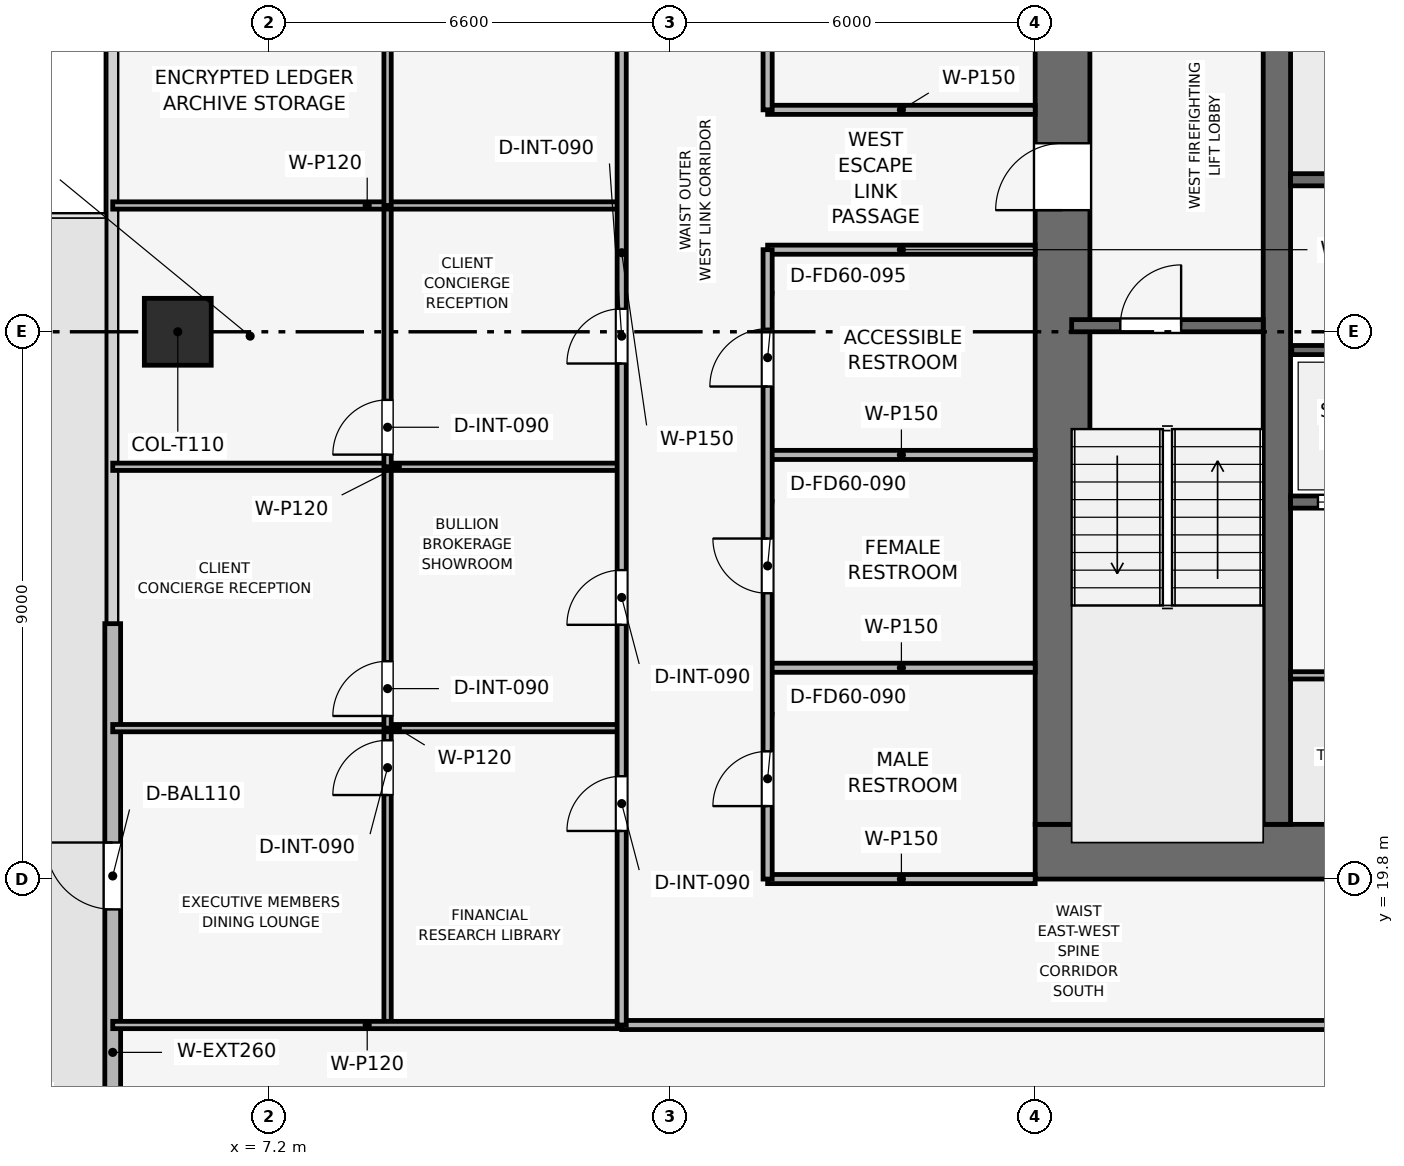
"""IFC4 building model, lengths in metres.
Left out: names, types, materials, properties, quantities, classifications, styles, units other than length and angle.
Written with IfcOpenShell. Run it as: python <this file> out.ifc"""

import sys

from ifc_helpers import new_model, si_unit, direction, frame, frame_2d, origin, origin_2d, place, context, subcontext, project, spatial, rectangle, extrude, element, fill, save


model = new_model("IFC4")
c1 = context("Model", 3, precision=1e-05, world=origin(), true_north=direction((0.0, 1.0)))
c2 = subcontext(c1, "Body", "Model", "MODEL_VIEW")
j1 = project(units=[si_unit("LENGTHUNIT", "METRE"), si_unit("PLANEANGLEUNIT", "RADIAN")], contexts=[c1])
p1 = place(None, origin())
s1 = spatial("IfcSite", under=j1, at=p1, CompositionType="ELEMENT")
p2 = place(p1, origin())
s2 = spatial("IfcBuilding", under=s1, at=p2, CompositionType="ELEMENT")
p3 = place(p2, frame((0.0, 0.0, 153.3)))
s3 = spatial("IfcBuildingStorey", under=s2, at=p3, CompositionType="ELEMENT", Elevation=153.3)
p4 = place(p3, frame((19.8, 20.25, 0.0), z_axis=(0.0, 0.0, 1.0), x_axis=(1.0, 0.0, 0.0)))
e1 = element("IfcWall", 1, at=p4, inside=s3, PredefinedType="SHEAR", context=c2, shape_type="SweptSolid", body=[
    extrude(rectangle(XDim=18.0, YDim=0.9, at=frame_2d((9.0, 0.0))), origin(), (0.0, 0.0, 1.0), 3.75),
])
p5 = place(p4, frame((8.4, 0.0, 0.0)))
e2 = element("IfcOpeningElement", 2, at=p5, cuts=e1, PredefinedType="OPENING", context=c2, shape_type="SweptSolid", body=[
    extrude(rectangle(XDim=1.2, YDim=2.2, at=frame_2d((0.6, 1.1))), frame((0.0, 0.46, 0.0), z_axis=(0.0, -1.0, 0.0), x_axis=(1.0, 0.0, 0.0)), (0.0, 0.0, 1.0), 0.92),
])
p6 = place(p3, frame((20.25, 20.7, 0.0), z_axis=(0.0, 0.0, 1.0), x_axis=(0.0, 1.0, 0.0)))
e3 = element("IfcWall", 3, at=p6, inside=s3, PredefinedType="SHEAR", context=c2, shape_type="SweptSolid", body=[
    extrude(rectangle(XDim=16.2, YDim=0.9, at=frame_2d((8.1, 0.0))), origin(), (0.0, 0.0, 1.0), 3.75),
])
p7 = place(p6, frame((10.1, 0.0, 0.0)))
e4 = element("IfcOpeningElement", 4, at=p7, cuts=e3, PredefinedType="OPENING", context=c2, shape_type="SweptSolid", body=[
    extrude(rectangle(XDim=1.1, YDim=2.15, at=frame_2d((0.55, 1.075))), frame((0.0, 0.46, 0.0), z_axis=(0.0, -1.0, 0.0), x_axis=(1.0, 0.0, 0.0)), (0.0, 0.0, 1.0), 0.92),
])
p8 = place(p3, frame((23.775, 20.7, 0.0), z_axis=(0.0, 0.0, 1.0), x_axis=(0.0, 1.0, 0.0)))
e5 = element("IfcWall", 5, at=p8, inside=s3, PredefinedType="SHEAR", context=c2, shape_type="SweptSolid", body=[
    extrude(rectangle(XDim=16.2, YDim=0.45, at=frame_2d((8.1, 0.0))), origin(), (0.0, 0.0, 1.0), 3.75),
])
p9 = place(p3, frame((5.7, 28.8, 0.003), z_axis=(0.0, 0.0, 1.0), x_axis=(1.0, 0.0, 0.0)))
e6 = element("IfcColumn", 6, at=p9, inside=s3, PredefinedType="COLUMN", context=c2, shape_type="SweptSolid", body=[
    extrude(rectangle(XDim=1.1, YDim=1.1, at=origin_2d()), origin(), (0.0, 0.0, 1.0), 3.489),
])
p10 = place(p3, frame((4.63, 11.4, 0.0), z_axis=(0.0, 0.0, 1.0), x_axis=(0.0, 1.0, 0.0)))
e7 = element("IfcWall", 7, at=p10, inside=s3, PredefinedType="SOLIDWALL", context=c2, shape_type="SweptSolid", body=[
    extrude(rectangle(XDim=12.6, YDim=0.26, at=frame_2d((6.3, 0.0))), origin(), (0.0, 0.0, 1.0), 3.495),
])
p11 = place(p10, frame((7.901, 0.0, 0.0)))
e8 = element("IfcOpeningElement", 8, at=p11, cuts=e7, PredefinedType="OPENING", context=c2, shape_type="SweptSolid", body=[
    extrude(rectangle(XDim=1.1, YDim=2.2, at=frame_2d((0.55, 1.1))), frame((0.0, 0.14, 0.0), z_axis=(0.0, -1.0, 0.0), x_axis=(1.0, 0.0, 0.0)), (0.0, 0.0, 1.0), 0.28),
])
p12 = place(p3, frame((20.4, 28.9, 0.0), z_axis=(0.0, 0.0, 1.0), x_axis=(1.0, 0.0, 0.0)))
e9 = element("IfcWall", 9, at=p12, inside=s3, PredefinedType="SHEAR", context=c2, shape_type="SweptSolid", body=[
    extrude(rectangle(XDim=3.15, YDim=0.2, at=frame_2d((1.575, 0.0))), origin(), (0.0, 0.0, 1.0), 3.495),
])
p13 = place(p12, frame((0.8, 0.0, 0.0)))
e10 = element("IfcOpeningElement", 10, at=p13, cuts=e9, PredefinedType="OPENING", context=c2, shape_type="SweptSolid", body=[
    extrude(rectangle(XDim=1.0, YDim=2.1, at=frame_2d((0.5, 1.05))), frame((0.0, 0.11, 0.0), z_axis=(0.0, -1.0, 0.0), x_axis=(1.0, 0.0, 0.0)), (0.0, 0.0, 1.0), 0.22),
])
p14 = place(p3, frame((24.0, 26.0, 0.0), z_axis=(0.0, 0.0, 1.0), x_axis=(1.0, 0.0, 0.0)))
e11 = element("IfcWall", 11, at=p14, inside=s3, PredefinedType="SHEAR", context=c2, shape_type="SweptSolid", body=[
    extrude(rectangle(XDim=2.0, YDim=0.2, at=frame_2d((1.0, 0.0))), origin(), (0.0, 0.0, 1.0), 3.495),
])
p15 = place(p14, frame((0.45, 0.0, 0.0)))
e12 = element("IfcOpeningElement", 12, at=p15, cuts=e11, PredefinedType="OPENING", context=c2, shape_type="SweptSolid", body=[
    extrude(rectangle(XDim=1.1, YDim=2.15, at=frame_2d((0.55, 1.075))), frame((0.0, 0.11, 0.0), z_axis=(0.0, -1.0, 0.0), x_axis=(1.0, 0.0, 0.0)), (0.0, 0.0, 1.0), 0.22),
])
p16 = place(p3, frame((24.0, 31.3, 0.0), z_axis=(0.0, 0.0, 1.0), x_axis=(1.0, 0.0, 0.0)))
e13 = element("IfcWall", 13, at=p16, inside=s3, PredefinedType="SHEAR", context=c2, shape_type="SweptSolid", body=[
    extrude(rectangle(XDim=2.0, YDim=0.2, at=frame_2d((1.0, 0.0))), origin(), (0.0, 0.0, 1.0), 3.495),
])
p17 = place(p3, frame((24.02, 28.5, 0.0), z_axis=(0.0, 0.0, 1.0), x_axis=(1.0, 0.0, 0.0)))
e14 = element("IfcWall", 14, at=p17, inside=s3, PredefinedType="SHEAR", context=c2, shape_type="SweptSolid", body=[
    extrude(rectangle(XDim=4.08, YDim=0.15, at=frame_2d((2.04, 0.0))), origin(), (0.0, 0.0, 1.0), 3.495),
])
p18 = place(p3, frame((24.0, 23.15, 0.0), z_axis=(0.0, 0.0, 1.0), x_axis=(1.0, 0.0, 0.0)))
e15 = element("IfcWall", 15, at=p18, inside=s3, PredefinedType="PARTITIONING", context=c2, shape_type="SweptSolid", body=[
    extrude(rectangle(XDim=4.05, YDim=0.12, at=frame_2d((2.025, 0.0))), origin(), (0.0, 0.0, 1.0), 3.495),
])
p19 = place(p18, frame((1.575, 0.0, 0.0)))
e16 = element("IfcOpeningElement", 16, at=p19, cuts=e15, PredefinedType="OPENING", context=c2, shape_type="SweptSolid", body=[
    extrude(rectangle(XDim=0.9, YDim=2.1, at=frame_2d((0.45, 1.05))), frame((0.0, 0.07, 0.0), z_axis=(0.0, -1.0, 0.0), x_axis=(1.0, 0.0, 0.0)), (0.0, 0.0, 1.0), 0.14),
])
p20 = place(p3, frame((15.4, 19.8, 0.0), z_axis=(0.0, 0.0, 1.0), x_axis=(1.0, 0.0, 0.0)))
e17 = element("IfcWall", 17, at=p20, inside=s3, PredefinedType="PARTITIONING", context=c2, shape_type="SweptSolid", body=[
    extrude(rectangle(XDim=4.4, YDim=0.15, at=frame_2d((2.2, 0.0))), origin(), (0.0, 0.0, 1.0), 3.03),
])
for number, where, z_axis, x_axis in (
    (18, (15.4, 23.275, 0.0), (0.0, 0.0, 1.0), (1.0, 0.0, 0.0)),
    (19, (15.4, 26.775, 0.0), (0.0, 0.0, 1.0), (1.0, 0.0, 0.0)),
    (20, (15.4, 30.15, 0.0), (0.0, 0.0, 1.0), (1.0, 0.0, 0.0)),
    (21, (15.4, 32.45, 0.0), (0.0, 0.0, 1.0), (1.0, 0.0, 0.0)),
):
    element("IfcWall", number, at=place(p3, frame(where, z_axis=z_axis, x_axis=x_axis)), inside=s3, PredefinedType="PARTITIONING", context=c2, shape_type="SweptSolid", body=[
        extrude(rectangle(XDim=4.4, YDim=0.15, at=frame_2d((2.2, 0.0))), origin(), (0.0, 0.0, 1.0), 3.495),
    ])
p21 = place(p3, frame((15.4, 19.8, 0.0), z_axis=(0.0, 0.0, 1.0), x_axis=(0.0, 1.0, 0.0)))
e22 = element("IfcWall", 22, at=p21, inside=s3, PredefinedType="PARTITIONING", context=c2, shape_type="SweptSolid", body=[
    extrude(rectangle(XDim=10.35, YDim=0.15, at=frame_2d((5.175, 0.0))), origin(), (0.0, 0.0, 1.0), 3.03),
])
p22 = place(p21, frame((1.2, 0.0, 0.0)))
e23 = element("IfcOpeningElement", 23, at=p22, cuts=e22, PredefinedType="OPENING", context=c2, shape_type="SweptSolid", body=[
    extrude(rectangle(XDim=0.9, YDim=2.1, at=frame_2d((0.45, 1.05))), frame((0.0, 0.085, 0.0), z_axis=(0.0, -1.0, 0.0), x_axis=(1.0, 0.0, 0.0)), (0.0, 0.0, 1.0), 0.17),
])
p23 = place(p21, frame((4.7, 0.0, 0.0)))
e24 = element("IfcOpeningElement", 24, at=p23, cuts=e22, PredefinedType="OPENING", context=c2, shape_type="SweptSolid", body=[
    extrude(rectangle(XDim=0.9, YDim=2.1, at=frame_2d((0.45, 1.05))), frame((0.0, 0.085, 0.0), z_axis=(0.0, -1.0, 0.0), x_axis=(1.0, 0.0, 0.0)), (0.0, 0.0, 1.0), 0.17),
])
p24 = place(p21, frame((8.1, 0.0, 0.0)))
e25 = element("IfcOpeningElement", 25, at=p24, cuts=e22, PredefinedType="OPENING", context=c2, shape_type="SweptSolid", body=[
    extrude(rectangle(XDim=0.95, YDim=2.1, at=frame_2d((0.475, 1.05))), frame((0.0, 0.085, 0.0), z_axis=(0.0, -1.0, 0.0), x_axis=(1.0, 0.0, 0.0)), (0.0, 0.0, 1.0), 0.17),
])
p25 = place(p3, frame((15.4, 32.45, 0.0), z_axis=(0.0, 0.0, 1.0), x_axis=(0.0, 1.0, 0.0)))
e26 = element("IfcWall", 26, at=p25, inside=s3, PredefinedType="PARTITIONING", context=c2, shape_type="SweptSolid", body=[
    extrude(rectangle(XDim=5.35, YDim=0.15, at=frame_2d((2.675, 0.0))), origin(), (0.0, 0.0, 1.0), 3.03),
])
p26 = place(p25, frame((2.1, 0.0, 0.0)))
e27 = element("IfcOpeningElement", 27, at=p26, cuts=e26, PredefinedType="OPENING", context=c2, shape_type="SweptSolid", body=[
    extrude(rectangle(XDim=0.9, YDim=2.1, at=frame_2d((0.45, 1.05))), frame((0.0, 0.085, 0.0), z_axis=(0.0, -1.0, 0.0), x_axis=(1.0, 0.0, 0.0)), (0.0, 0.0, 1.0), 0.17),
])
p27 = place(p3, frame((9.15, 17.4, 0.0), z_axis=(0.0, 0.0, 1.0), x_axis=(0.0, 1.0, 0.0)))
e28 = element("IfcWall", 28, at=p27, inside=s3, PredefinedType="PARTITIONING", context=c2, shape_type="SweptSolid", body=[
    extrude(rectangle(XDim=4.882, YDim=0.12, at=frame_2d((2.441, 0.0))), origin(), (0.0, 0.0, 1.0), 3.03),
])
p28 = place(p27, frame((3.782, 0.0, 0.0)))
e29 = element("IfcOpeningElement", 29, at=p28, cuts=e28, PredefinedType="OPENING", context=c2, shape_type="SweptSolid", body=[
    extrude(rectangle(XDim=0.9, YDim=2.1, at=frame_2d((0.45, 1.05))), frame((0.0, 0.07, 0.0), z_axis=(0.0, -1.0, 0.0), x_axis=(1.0, 0.0, 0.0)), (0.0, 0.0, 1.0), 0.14),
])
p29 = place(p3, frame((4.63, 22.282, 0.0), z_axis=(0.0, 0.0, 1.0), x_axis=(1.0, 0.0, 0.0)))
e30 = element("IfcWall", 30, at=p29, inside=s3, PredefinedType="PARTITIONING", context=c2, shape_type="SweptSolid", body=[
    extrude(rectangle(XDim=8.37, YDim=0.12, at=frame_2d((4.185, 0.0))), origin(), (0.0, 0.0, 1.0), 2.98),
])
p30 = place(p3, frame((9.15, 22.282, 0.0), z_axis=(0.0, 0.0, 1.0), x_axis=(0.0, 1.0, 0.0)))
e31 = element("IfcWall", 31, at=p30, inside=s3, PredefinedType="PARTITIONING", context=c2, shape_type="SweptSolid", body=[
    extrude(rectangle(XDim=4.298, YDim=0.12, at=frame_2d((2.149, 0.0))), origin(), (0.0, 0.0, 1.0), 3.495),
])
p31 = place(p30, frame((0.2, 0.0, 0.0)))
e32 = element("IfcOpeningElement", 32, at=p31, cuts=e31, PredefinedType="OPENING", context=c2, shape_type="SweptSolid", body=[
    extrude(rectangle(XDim=0.9, YDim=2.1, at=frame_2d((0.45, 1.05))), frame((0.0, 0.07, 0.0), z_axis=(0.0, -1.0, 0.0), x_axis=(1.0, 0.0, 0.0)), (0.0, 0.0, 1.0), 0.14),
])
p32 = place(p3, frame((4.63, 26.58, 0.0), z_axis=(0.0, 0.0, 1.0), x_axis=(1.0, 0.0, 0.0)))
e33 = element("IfcWall", 33, at=p32, inside=s3, PredefinedType="PARTITIONING", context=c2, shape_type="SweptSolid", body=[
    extrude(rectangle(XDim=8.37, YDim=0.12, at=frame_2d((4.185, 0.0))), origin(), (0.0, 0.0, 1.0), 2.98),
])
p33 = place(p3, frame((9.15, 26.58, 0.0), z_axis=(0.0, 0.0, 1.0), x_axis=(0.0, 1.0, 0.0)))
e34 = element("IfcWall", 34, at=p33, inside=s3, PredefinedType="PARTITIONING", context=c2, shape_type="SweptSolid", body=[
    extrude(rectangle(XDim=4.297, YDim=0.12, at=frame_2d((2.148, 0.0))), origin(), (0.0, 0.0, 1.0), 3.03),
])
p34 = place(p33, frame((0.2, 0.0, 0.0)))
e35 = element("IfcOpeningElement", 35, at=p34, cuts=e34, PredefinedType="OPENING", context=c2, shape_type="SweptSolid", body=[
    extrude(rectangle(XDim=0.9, YDim=2.1, at=frame_2d((0.45, 1.05))), frame((0.0, 0.07, 0.0), z_axis=(0.0, -1.0, 0.0), x_axis=(1.0, 0.0, 0.0)), (0.0, 0.0, 1.0), 0.14),
])
p35 = place(p3, frame((4.63, 30.877, 0.0), z_axis=(0.0, 0.0, 1.0), x_axis=(1.0, 0.0, 0.0)))
e36 = element("IfcWall", 36, at=p35, inside=s3, PredefinedType="PARTITIONING", context=c2, shape_type="SweptSolid", body=[
    extrude(rectangle(XDim=8.37, YDim=0.12, at=frame_2d((4.185, 0.0))), origin(), (0.0, 0.0, 1.0), 2.98),
])
p36 = place(p3, frame((9.15, 30.877, 0.0), z_axis=(0.0, 0.0, 1.0), x_axis=(0.0, 1.0, 0.0)))
e37 = element("IfcWall", 37, at=p36, inside=s3, PredefinedType="PARTITIONING", context=c2, shape_type="SweptSolid", body=[
    extrude(rectangle(XDim=9.323, YDim=0.12, at=frame_2d((4.662, 0.0))), origin(), (0.0, 0.0, 1.0), 3.03),
])
p37 = place(p36, frame((4.212, 0.0, 0.0)))
e38 = element("IfcOpeningElement", 38, at=p37, cuts=e37, PredefinedType="OPENING", context=c2, shape_type="SweptSolid", body=[
    extrude(rectangle(XDim=0.9, YDim=2.1, at=frame_2d((0.45, 1.05))), frame((0.0, 0.07, 0.0), z_axis=(0.0, -1.0, 0.0), x_axis=(1.0, 0.0, 0.0)), (0.0, 0.0, 1.0), 0.14),
])
p38 = place(p3, frame((4.63, 17.4, 0.0), z_axis=(0.0, 0.0, 1.0), x_axis=(1.0, 0.0, 0.0)))
e39 = element("IfcWall", 39, at=p38, inside=s3, PredefinedType="PARTITIONING", context=c2, shape_type="SweptSolid", body=[
    extrude(rectangle(XDim=8.37, YDim=0.12, at=frame_2d((4.185, 0.0))), origin(), (0.0, 0.0, 1.0), 2.98),
])
p39 = place(p3, frame((13.0, 17.4, 0.0), z_axis=(0.0, 0.0, 1.0), x_axis=(1.0, 0.0, 0.0)))
e40 = element("IfcWall", 40, at=p39, inside=s3, PredefinedType="PARTITIONING", context=c2, shape_type="SweptSolid", body=[
    extrude(rectangle(XDim=31.6, YDim=0.15, at=frame_2d((15.8, 0.0))), origin(), (0.0, 0.0, 1.0), 3.03),
])
p40 = place(p39, frame((15.35, 0.0, 0.0)))
e41 = element("IfcOpeningElement", 41, at=p40, cuts=e40, PredefinedType="OPENING", context=c2, shape_type="SweptSolid", body=[
    extrude(rectangle(XDim=0.9, YDim=2.1, at=frame_2d((0.45, 1.05))), frame((0.0, 0.085, 0.0), z_axis=(0.0, -1.0, 0.0), x_axis=(1.0, 0.0, 0.0)), (0.0, 0.0, 1.0), 0.17),
])
p41 = place(p3, frame((13.0, 17.4, 0.0), z_axis=(0.0, 0.0, 1.0), x_axis=(0.0, 1.0, 0.0)))
e42 = element("IfcWall", 42, at=p41, inside=s3, PredefinedType="PARTITIONING", context=c2, shape_type="SweptSolid", body=[
    extrude(rectangle(XDim=22.8, YDim=0.15, at=frame_2d((11.4, 0.0))), origin(), (0.0, 0.0, 1.0), 3.03),
])
p42 = place(p41, frame((3.191, 0.0, 0.0)))
e43 = element("IfcOpeningElement", 43, at=p42, cuts=e42, PredefinedType="OPENING", context=c2, shape_type="SweptSolid", body=[
    extrude(rectangle(XDim=0.9, YDim=2.1, at=frame_2d((0.45, 1.05))), frame((0.0, 0.085, 0.0), z_axis=(0.0, -1.0, 0.0), x_axis=(1.0, 0.0, 0.0)), (0.0, 0.0, 1.0), 0.17),
])
p43 = place(p41, frame((6.581, 0.0, 0.0)))
e44 = element("IfcOpeningElement", 44, at=p43, cuts=e42, PredefinedType="OPENING", context=c2, shape_type="SweptSolid", body=[
    extrude(rectangle(XDim=0.9, YDim=2.1, at=frame_2d((0.45, 1.05))), frame((0.0, 0.085, 0.0), z_axis=(0.0, -1.0, 0.0), x_axis=(1.0, 0.0, 0.0)), (0.0, 0.0, 1.0), 0.17),
])
p44 = place(p41, frame((10.878, 0.0, 0.0)))
e45 = element("IfcOpeningElement", 45, at=p44, cuts=e42, PredefinedType="OPENING", context=c2, shape_type="SweptSolid", body=[
    extrude(rectangle(XDim=0.9, YDim=2.1, at=frame_2d((0.45, 1.05))), frame((0.0, 0.085, 0.0), z_axis=(0.0, -1.0, 0.0), x_axis=(1.0, 0.0, 0.0)), (0.0, 0.0, 1.0), 0.17),
])
p45 = place(p41, frame((16.488, 0.0, 0.0)))
e46 = element("IfcOpeningElement", 46, at=p45, cuts=e42, PredefinedType="OPENING", context=c2, shape_type="SweptSolid", body=[
    extrude(rectangle(XDim=0.9, YDim=2.1, at=frame_2d((0.45, 1.05))), frame((0.0, 0.085, 0.0), z_axis=(0.0, -1.0, 0.0), x_axis=(1.0, 0.0, 0.0)), (0.0, 0.0, 1.0), 0.17),
])
p46 = place(p11, origin())
e47 = element("IfcDoor", 47, at=p46, inside=s3, OperationType="SINGLE_SWING_RIGHT", PredefinedType="DOOR", context=c2, shape_type="SweptSolid", body=[
    extrude(rectangle(XDim=1.1, YDim=2.2, at=frame_2d((0.55, 1.1))), frame((0.0, 0.025, 0.0), z_axis=(0.0, -1.0, 0.0), x_axis=(1.0, 0.0, 0.0)), (0.0, 0.0, 1.0), 0.05),
])
fill(e8, e47)
p47 = place(p13, origin())
e48 = element("IfcDoor", 48, at=p47, inside=s3, OperationType="SINGLE_SWING_RIGHT", PredefinedType="DOOR", context=c2, shape_type="SweptSolid", body=[
    extrude(rectangle(XDim=1.0, YDim=2.1, at=frame_2d((0.5, 1.05))), frame((0.0, 0.025, 0.0), z_axis=(0.0, -1.0, 0.0), x_axis=(1.0, 0.0, 0.0)), (0.0, 0.0, 1.0), 0.05),
])
fill(e10, e48)
p48 = place(p15, origin())
e49 = element("IfcDoor", 49, at=p48, inside=s3, OperationType="SLIDING_TO_RIGHT", PredefinedType="DOOR", context=c2, shape_type="SweptSolid", body=[
    extrude(rectangle(XDim=1.1, YDim=2.15, at=frame_2d((0.55, 1.075))), frame((0.0, 0.025, 0.0), z_axis=(0.0, -1.0, 0.0), x_axis=(1.0, 0.0, 0.0)), (0.0, 0.0, 1.0), 0.05),
])
fill(e12, e49)
p49 = place(p22, origin())
e50 = element("IfcDoor", 50, at=p49, inside=s3, OperationType="SINGLE_SWING_LEFT", PredefinedType="DOOR", context=c2, shape_type="SweptSolid", body=[
    extrude(rectangle(XDim=0.9, YDim=2.1, at=frame_2d((0.45, 1.05))), frame((0.0, 0.025, 0.0), z_axis=(0.0, -1.0, 0.0), x_axis=(1.0, 0.0, 0.0)), (0.0, 0.0, 1.0), 0.05),
])
fill(e23, e50)
p50 = place(p23, origin())
e51 = element("IfcDoor", 51, at=p50, inside=s3, OperationType="SINGLE_SWING_RIGHT", PredefinedType="DOOR", context=c2, shape_type="SweptSolid", body=[
    extrude(rectangle(XDim=0.9, YDim=2.1, at=frame_2d((0.45, 1.05))), frame((0.0, 0.025, 0.0), z_axis=(0.0, -1.0, 0.0), x_axis=(1.0, 0.0, 0.0)), (0.0, 0.0, 1.0), 0.05),
])
fill(e24, e51)
p51 = place(p24, origin())
e52 = element("IfcDoor", 52, at=p51, inside=s3, OperationType="SINGLE_SWING_LEFT", PredefinedType="DOOR", context=c2, shape_type="SweptSolid", body=[
    extrude(rectangle(XDim=0.95, YDim=2.1, at=frame_2d((0.475, 1.05))), frame((0.0, 0.025, 0.0), z_axis=(0.0, -1.0, 0.0), x_axis=(1.0, 0.0, 0.0)), (0.0, 0.0, 1.0), 0.05),
])
fill(e25, e52)
p52 = place(p28, origin())
e53 = element("IfcDoor", 53, at=p52, inside=s3, OperationType="SINGLE_SWING_LEFT", PredefinedType="DOOR", context=c2, shape_type="SweptSolid", body=[
    extrude(rectangle(XDim=0.9, YDim=2.1, at=frame_2d((0.45, 1.05))), frame((0.0, 0.025, 0.0), z_axis=(0.0, -1.0, 0.0), x_axis=(1.0, 0.0, 0.0)), (0.0, 0.0, 1.0), 0.05),
])
fill(e29, e53)
p53 = place(p31, origin())
e54 = element("IfcDoor", 54, at=p53, inside=s3, OperationType="SINGLE_SWING_LEFT", PredefinedType="DOOR", context=c2, shape_type="SweptSolid", body=[
    extrude(rectangle(XDim=0.9, YDim=2.1, at=frame_2d((0.45, 1.05))), frame((0.0, 0.025, 0.0), z_axis=(0.0, -1.0, 0.0), x_axis=(1.0, 0.0, 0.0)), (0.0, 0.0, 1.0), 0.05),
])
fill(e32, e54)
p54 = place(p34, origin())
e55 = element("IfcDoor", 55, at=p54, inside=s3, OperationType="SINGLE_SWING_LEFT", PredefinedType="DOOR", context=c2, shape_type="SweptSolid", body=[
    extrude(rectangle(XDim=0.9, YDim=2.1, at=frame_2d((0.45, 1.05))), frame((0.0, 0.025, 0.0), z_axis=(0.0, -1.0, 0.0), x_axis=(1.0, 0.0, 0.0)), (0.0, 0.0, 1.0), 0.05),
])
fill(e35, e55)
p55 = place(p42, origin())
e56 = element("IfcDoor", 56, at=p55, inside=s3, OperationType="SINGLE_SWING_LEFT", PredefinedType="DOOR", context=c2, shape_type="SweptSolid", body=[
    extrude(rectangle(XDim=0.9, YDim=2.1, at=frame_2d((0.45, 1.05))), frame((0.0, 0.025, 0.0), z_axis=(0.0, -1.0, 0.0), x_axis=(1.0, 0.0, 0.0)), (0.0, 0.0, 1.0), 0.05),
])
fill(e43, e56)
p56 = place(p43, origin())
e57 = element("IfcDoor", 57, at=p56, inside=s3, OperationType="SINGLE_SWING_LEFT", PredefinedType="DOOR", context=c2, shape_type="SweptSolid", body=[
    extrude(rectangle(XDim=0.9, YDim=2.1, at=frame_2d((0.45, 1.05))), frame((0.0, 0.025, 0.0), z_axis=(0.0, -1.0, 0.0), x_axis=(1.0, 0.0, 0.0)), (0.0, 0.0, 1.0), 0.05),
])
fill(e44, e57)
p57 = place(p44, origin())
e58 = element("IfcDoor", 58, at=p57, inside=s3, OperationType="SINGLE_SWING_LEFT", PredefinedType="DOOR", context=c2, shape_type="SweptSolid", body=[
    extrude(rectangle(XDim=0.9, YDim=2.1, at=frame_2d((0.45, 1.05))), frame((0.0, 0.025, 0.0), z_axis=(0.0, -1.0, 0.0), x_axis=(1.0, 0.0, 0.0)), (0.0, 0.0, 1.0), 0.05),
])
fill(e45, e58)
p58 = place(p7, origin())
e59 = element("IfcDoor", 59, at=p58, inside=s3, OperationType="SINGLE_SWING_LEFT", PredefinedType="DOOR", context=c2, shape_type="SweptSolid", body=[
    extrude(rectangle(XDim=1.1, YDim=2.15, at=frame_2d((0.55, 1.075))), frame((0.0, 0.025, 0.0), z_axis=(0.0, -1.0, 0.0), x_axis=(1.0, 0.0, 0.0)), (0.0, 0.0, 1.0), 0.05),
])
fill(e4, e59)
save(model, sys.argv[1])
